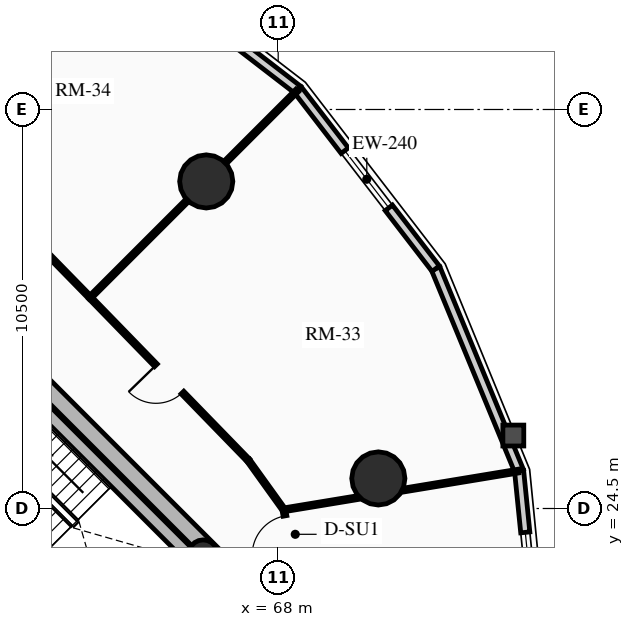
"""IFC4 building model, lengths in metres.
Left out: names, types, materials, properties, quantities, classifications, styles, units other than length and angle.
Written with IfcOpenShell. Run it as: python <this file> out.ifc"""

import sys

from ifc_helpers import new_model, si_unit, direction, frame, frame_2d, origin, origin_2d, place, context, subcontext, project, spatial, rectangle, circle, hollow_circle, extrude, source, transform, mapped, element, fill, save


model = new_model("IFC4")
c1 = context("Model", 3, precision=1e-05, world=origin(), true_north=direction((0.0, 1.0)))
c2 = subcontext(c1, "Body", "Model", "MODEL_VIEW")
j1 = project(units=[si_unit("LENGTHUNIT", "METRE"), si_unit("PLANEANGLEUNIT", "RADIAN")], contexts=[c1])
p1 = place(None, origin())
s1 = spatial("IfcSite", under=j1, at=p1, CompositionType="ELEMENT")
p2 = place(p1, origin())
s2 = spatial("IfcBuilding", under=s1, at=p2, CompositionType="ELEMENT")
p3 = place(p2, frame((0.0, 0.0, 99.25)))
s3 = spatial("IfcBuildingStorey", under=s2, at=p3, CompositionType="ELEMENT", Elevation=99.25)
p4 = place(p3, frame((66.303, 23.263, 0.0), z_axis=(0.0, 0.0, 1.0), x_axis=(-0.707106781187, 0.707106781187, 0.0)))
e1 = element("IfcWall", 1, at=p4, inside=s3, PredefinedType="SHEAR", context=c2, shape_type="SweptSolid", body=[
    extrude(rectangle(XDim=14.2, YDim=0.45, at=frame_2d((7.1, 0.0))), origin(), (0.0, 0.0, 1.0), 2.91),
])
p5 = place(p3, frame((58.578, 15.856, 0.0), z_axis=(0.0, 0.0, 1.0), x_axis=(0.707106781187, 0.707106781187, 0.0)))
e2 = element("IfcWall", 2, at=p5, inside=s3, PredefinedType="SHEAR", context=c2, shape_type="SweptSolid", body=[
    extrude(rectangle(XDim=10.7, YDim=0.45, at=frame_2d((5.35, 0.0))), origin(), (0.0, 0.0, 1.0), 2.91),
])
m1 = source(origin(), c2, "Body", "SweptSolid", [
    extrude(rectangle(XDim=1.5, YDim=2.02, at=frame_2d((0.75, 1.01))), frame((0.0, 0.235, 0.0), z_axis=(0.0, -1.0, 0.0), x_axis=(1.0, 0.0, 0.0)), (0.0, 0.0, 1.0), 0.47),
])
p6 = place(p5, frame((5.45, 0.0, 0.0)))
e3 = element("IfcOpeningElement", 3, at=p6, cuts=e2, PredefinedType="OPENING", context=c2, shape_type="MappedRepresentation", body=[
    mapped(m1, transform((0.0, 0.0, 0.0), x_axis=(1.0, 0.0, 0.0), y_axis=(0.0, 1.0, 0.0), z_axis=(0.0, 0.0, 1.0), scale=1.0)),
])
p7 = place(p3, frame((63.645, 20.922, 0.0), z_axis=(0.0, 0.0, 1.0), x_axis=(-0.707106781187, 0.707106781187, 0.0)))
e4 = element("IfcWall", 4, at=p7, inside=s3, PredefinedType="SHEAR", context=c2, shape_type="SweptSolid", body=[
    extrude(rectangle(XDim=13.75, YDim=0.35, at=frame_2d((6.875, 0.0))), origin(), (0.0, 0.0, 1.0), 2.91),
])
m2 = source(origin(), c2, "Body", "SweptSolid", [
    extrude(rectangle(XDim=1.1, YDim=2.015, at=frame_2d((0.55, 1.007))), frame((0.0, 0.185, 0.0), z_axis=(0.0, -1.0, 0.0), x_axis=(1.0, 0.0, 0.0)), (0.0, 0.0, 1.0), 0.37),
])
p8 = place(p7, frame((10.0, 0.0, 0.0)))
e5 = element("IfcOpeningElement", 5, at=p8, cuts=e4, PredefinedType="OPENING", context=c2, shape_type="MappedRepresentation", body=[
    mapped(m2, transform((0.0, 0.0, 0.0), x_axis=(1.0, 0.0, 0.0), y_axis=(0.0, 1.0, 0.0), z_axis=(0.0, 0.0, 1.0), scale=1.0)),
])
p9 = place(p7, frame((12.0, 0.0, 0.0)))
e6 = element("IfcOpeningElement", 6, at=p9, cuts=e4, PredefinedType="OPENING", context=c2, shape_type="MappedRepresentation", body=[
    mapped(m2, transform((0.0, 0.0, 0.0), x_axis=(1.0, 0.0, 0.0), y_axis=(0.0, 1.0, 0.0), z_axis=(0.0, 0.0, 1.0), scale=1.0)),
])
m3 = source(origin(), c2, "Body", "SweptSolid", [
    extrude(rectangle(XDim=1.15, YDim=2.02, at=frame_2d((0.575, 1.01))), frame((0.0, 0.185, 0.0), z_axis=(0.0, -1.0, 0.0), x_axis=(1.0, 0.0, 0.0)), (0.0, 0.0, 1.0), 0.37),
])
p10 = place(p7, frame((5.305, 0.0, 0.0)))
e7 = element("IfcOpeningElement", 7, at=p10, cuts=e4, PredefinedType="OPENING", context=c2, shape_type="MappedRepresentation", body=[
    mapped(m3, transform((0.0, 0.0, 0.0), x_axis=(1.0, 0.0, 0.0), y_axis=(0.0, 1.0, 0.0), z_axis=(0.0, 0.0, 1.0), scale=1.0)),
])
p11 = place(p3, frame((65.83, 23.107, 0.0), z_axis=(0.0, 0.0, 1.0), x_axis=(-0.707088616009, 0.707124945897, 0.0)))
e8 = element("IfcWall", 8, at=p11, inside=s3, PredefinedType="SHEAR", context=c2, shape_type="SweptSolid", body=[
    extrude(rectangle(XDim=6.72, YDim=0.35, at=frame_2d((3.36, 0.0))), origin(), (0.0, 0.0, 1.0), 2.91),
])
p12 = place(p3, frame((66.024, 23.294, 0.0), z_axis=(0.0, 0.0, 1.0), x_axis=(0.707106781187, 0.707106781187, 0.0)))
e9 = element("IfcColumn", 9, at=p12, inside=s3, PredefinedType="COLUMN", context=c2, shape_type="SweptSolid", body=[
    extrude(hollow_circle(Radius=0.38, WallThickness=0.032, at=origin_2d()), origin(), (0.0, 0.0, 1.0), 2.91),
])
for number, where, z_axis, x_axis in (
    (10, (66.107, 33.107, 0.0), (0.0, 0.0, 1.0), (1.0, 0.0, 0.0)),
    (11, (70.635, 25.291, 0.0), (0.0, 0.0, 1.0), (1.0, 0.0, 0.0)),
):
    element("IfcColumn", number, at=place(p3, frame(where, z_axis=z_axis, x_axis=x_axis)), inside=s3, PredefinedType="USERDEFINED", context=c2, shape_type="SweptSolid", body=[
        extrude(circle(Radius=0.7, at=origin_2d()), origin(), (0.0, 0.0, 1.0), 2.91),
    ])
p13 = place(p3, frame((63.811, 39.145, 0.0), z_axis=(0.0, 0.0, 1.0), x_axis=(0.791982052206, -0.61054437102, 0.0)))
e12 = element("IfcWall", 12, at=p13, inside=s3, PredefinedType="SOLIDWALL", context=c2, shape_type="SweptSolid", body=[
    extrude(rectangle(XDim=5.942, YDim=0.24, at=frame_2d((2.971, 0.0))), origin(), (0.0, 0.0, 1.0), 2.179),
])
p14 = place(p3, frame((74.339, 25.487, 0.0), z_axis=(0.0, 0.0, 1.0), x_axis=(0.10015591906, -0.994971754311, 0.0)))
e13 = element("IfcWall", 13, at=p14, inside=s3, PredefinedType="SOLIDWALL", context=c2, shape_type="SweptSolid", body=[
    extrude(rectangle(XDim=5.448, YDim=0.24, at=frame_2d((2.724, 0.0))), origin(), (0.0, 0.0, 1.0), 2.179),
])
m4 = source(origin(), c2, "Body", "SweptSolid", [
    extrude(rectangle(XDim=2.2, YDim=1.35, at=frame_2d((1.1, 0.675))), frame((0.0, 0.13, 0.0), z_axis=(0.0, -1.0, 0.0), x_axis=(1.0, 0.0, 0.0)), (0.0, 0.0, 1.0), 0.26),
])
p15 = place(p14, frame((1.624, 0.0, 0.65)))
e14 = element("IfcOpeningElement", 14, at=p15, cuts=e13, PredefinedType="OPENING", context=c2, shape_type="MappedRepresentation", body=[
    mapped(m4, transform((0.0, 0.0, 0.0), x_axis=(1.0, 0.0, 0.0), y_axis=(0.0, 1.0, 0.0), z_axis=(0.0, 0.0, 1.0), scale=1.0)),
])
p16 = place(p3, frame((72.145, 30.811, 0.0), z_axis=(0.0, 0.0, 1.0), x_axis=(0.381027003055, -0.924563909604, 0.0)))
e15 = element("IfcWall", 15, at=p16, inside=s3, PredefinedType="SOLIDWALL", context=c2, shape_type="SweptSolid", body=[
    extrude(rectangle(XDim=5.758, YDim=0.24, at=frame_2d((2.879, 0.0))), origin(), (0.0, 0.0, 1.0), 2.179),
])
p17 = place(p3, frame((68.517, 35.517, 0.0), z_axis=(0.0, 0.0, 1.0), x_axis=(0.61054437102, -0.791982052206, 0.0)))
e16 = element("IfcWall", 16, at=p17, inside=s3, PredefinedType="SOLIDWALL", context=c2, shape_type="SweptSolid", body=[
    extrude(rectangle(XDim=5.942, YDim=0.24, at=frame_2d((2.971, 0.0))), origin(), (0.0, 0.0, 1.0), 2.179),
])
m5 = source(origin(), c2, "Body", "SweptSolid", [
    extrude(rectangle(XDim=1.9, YDim=1.35, at=frame_2d((0.95, 0.675))), frame((0.0, 0.13, 0.0), z_axis=(0.0, -1.0, 0.0), x_axis=(1.0, 0.0, 0.0)), (0.0, 0.0, 1.0), 0.26),
])
p18 = place(p17, frame((2.021, 0.0, 0.65)))
e17 = element("IfcOpeningElement", 17, at=p18, cuts=e16, PredefinedType="OPENING", context=c2, shape_type="MappedRepresentation", body=[
    mapped(m5, transform((0.0, 0.0, 0.0), x_axis=(1.0, 0.0, 0.0), y_axis=(0.0, 1.0, 0.0), z_axis=(0.0, 0.0, 1.0), scale=1.0)),
])
p19 = place(p3, frame((63.051, 30.051, 0.0), z_axis=(0.0, 0.0, 1.0), x_axis=(-0.698911483116, 0.715208178622, 0.0)))
e18 = element("IfcWall", 18, at=p19, inside=s3, PredefinedType="MOVABLE", context=c2, shape_type="SweptSolid", body=[
    extrude(rectangle(XDim=6.082, YDim=0.1, at=frame_2d((3.041, 0.0))), origin(), (0.0, 0.0, 1.0), 2.225),
])
p20 = place(p3, frame((68.394, 23.113, 0.0), z_axis=(0.0, 0.0, 1.0), x_axis=(-0.177868948753, 0.984054184011, 0.0)))
e19 = element("IfcWall", 19, at=p20, inside=s3, PredefinedType="MOVABLE", context=c2, shape_type="SweptSolid", body=[
    extrude(rectangle(XDim=1.374, YDim=0.1, at=frame_2d((0.687, 0.0))), origin(), (0.0, 0.0, 1.0), 2.225),
])
m6 = source(origin(), c2, "Body", "SweptSolid", [
    extrude(rectangle(XDim=1.05, YDim=2.015, at=frame_2d((0.525, 1.007))), frame((0.0, 0.06, 0.0), z_axis=(0.0, -1.0, 0.0), x_axis=(1.0, 0.0, 0.0)), (0.0, 0.0, 1.0), 0.12),
])
p21 = place(p20, frame((0.162, 0.0, 0.0)))
e20 = element("IfcOpeningElement", 20, at=p21, cuts=e19, PredefinedType="OPENING", context=c2, shape_type="MappedRepresentation", body=[
    mapped(m6, transform((0.0, 0.0, 0.0), x_axis=(1.0, 0.0, 0.0), y_axis=(0.0, 1.0, 0.0), z_axis=(0.0, 0.0, 1.0), scale=1.0)),
])
p22 = place(p3, frame((68.15, 24.465, 0.0), z_axis=(0.0, 0.0, 1.0), x_axis=(-0.58376767291, 0.811920749868, 0.0)))
e21 = element("IfcWall", 21, at=p22, inside=s3, PredefinedType="MOVABLE", context=c2, shape_type="SweptSolid", body=[
    extrude(rectangle(XDim=1.605, YDim=0.1, at=frame_2d((0.803, 0.0))), origin(), (0.0, 0.0, 1.0), 2.225),
])
p23 = place(p3, frame((67.213, 25.768, 0.0), z_axis=(0.0, 0.0, 1.0), x_axis=(-0.696916079748, 0.717152687918, 0.0)))
e22 = element("IfcWall", 22, at=p23, inside=s3, PredefinedType="MOVABLE", context=c2, shape_type="SweptSolid", body=[
    extrude(rectangle(XDim=5.972, YDim=0.1, at=frame_2d((2.986, 0.0))), origin(), (0.0, 0.0, 1.0), 2.655),
])
m7 = source(origin(), c2, "Body", "SweptSolid", [
    extrude(rectangle(XDim=1.0, YDim=2.015, at=frame_2d((0.5, 1.007))), frame((0.0, 0.06, 0.0), z_axis=(0.0, -1.0, 0.0), x_axis=(1.0, 0.0, 0.0)), (0.0, 0.0, 1.0), 0.12),
])
p24 = place(p23, frame((2.486, 0.0, 0.0)))
e23 = element("IfcOpeningElement", 23, at=p24, cuts=e22, PredefinedType="OPENING", context=c2, shape_type="MappedRepresentation", body=[
    mapped(m7, transform((0.0, 0.0, 0.0), x_axis=(1.0, 0.0, 0.0), y_axis=(0.0, 1.0, 0.0), z_axis=(0.0, 0.0, 1.0), scale=1.0)),
])
p25 = place(p3, frame((63.051, 30.051, 0.0), z_axis=(0.0, 0.0, 1.0), x_axis=(0.707106781187, 0.707106781187, 0.0)))
e24 = element("IfcWall", 24, at=p25, inside=s3, PredefinedType="MOVABLE", context=c2, shape_type="SweptSolid", body=[
    extrude(rectangle(XDim=7.711, YDim=0.1, at=frame_2d((3.855, 0.0))), origin(), (0.0, 0.0, 1.0), 2.179),
])
p26 = place(p3, frame((68.15, 24.465, 0.0), z_axis=(0.0, 0.0, 1.0), x_axis=(0.986627164528, 0.162993368625, 0.0)))
e25 = element("IfcWall", 25, at=p26, inside=s3, PredefinedType="MOVABLE", context=c2, shape_type="SweptSolid", body=[
    extrude(rectangle(XDim=6.254, YDim=0.1, at=frame_2d((3.127, 0.0))), origin(), (0.0, 0.0, 1.0), 2.179),
])
m8 = source(origin(), c2, "Body", "SweptSolid", [
    extrude(rectangle(XDim=2.2, YDim=1.35, at=frame_2d((1.1, 0.675))), frame((0.0, 0.03, 0.0), z_axis=(0.0, -1.0, 0.0), x_axis=(1.0, 0.0, 0.0)), (0.0, 0.0, 1.0), 0.06),
])
p27 = place(p15, origin())
e26 = element("IfcWindow", 26, at=p27, inside=s3, PartitioningType="DOUBLE_PANEL_VERTICAL", PredefinedType="WINDOW", context=c2, shape_type="MappedRepresentation", body=[
    mapped(m8, transform((0.0, 0.0, 0.0), x_axis=(1.0, 0.0, 0.0), y_axis=(0.0, 1.0, 0.0), z_axis=(0.0, 0.0, 1.0), scale=1.0)),
])
fill(e14, e26)
m9 = source(origin(), c2, "Body", "SweptSolid", [
    extrude(rectangle(XDim=1.9, YDim=1.35, at=frame_2d((0.95, 0.675))), frame((0.0, 0.03, 0.0), z_axis=(0.0, -1.0, 0.0), x_axis=(1.0, 0.0, 0.0)), (0.0, 0.0, 1.0), 0.06),
])
p28 = place(p18, origin())
e27 = element("IfcWindow", 27, at=p28, inside=s3, PartitioningType="DOUBLE_PANEL_VERTICAL", PredefinedType="WINDOW", context=c2, shape_type="MappedRepresentation", body=[
    mapped(m9, transform((0.0, 0.0, 0.0), x_axis=(1.0, 0.0, 0.0), y_axis=(0.0, 1.0, 0.0), z_axis=(0.0, 0.0, 1.0), scale=1.0)),
])
fill(e17, e27)
m10 = source(origin(), c2, "Body", "SweptSolid", [
    extrude(rectangle(XDim=1.05, YDim=2.015, at=frame_2d((0.525, 1.007))), frame((0.0, 0.025, 0.0), z_axis=(0.0, -1.0, 0.0), x_axis=(1.0, 0.0, 0.0)), (0.0, 0.0, 1.0), 0.05),
])
p29 = place(p21, origin())
e28 = element("IfcDoor", 28, at=p29, inside=s3, OperationType="SINGLE_SWING_LEFT", PredefinedType="DOOR", context=c2, shape_type="MappedRepresentation", body=[
    mapped(m10, transform((0.0, 0.0, 0.0), x_axis=(1.0, 0.0, 0.0), y_axis=(0.0, 1.0, 0.0), z_axis=(0.0, 0.0, 1.0), scale=1.0)),
])
fill(e20, e28)
m11 = source(origin(), c2, "Body", "SweptSolid", [
    extrude(rectangle(XDim=1.0, YDim=2.015, at=frame_2d((0.5, 1.007))), frame((0.0, 0.025, 0.0), z_axis=(0.0, -1.0, 0.0), x_axis=(1.0, 0.0, 0.0)), (0.0, 0.0, 1.0), 0.05),
])
p30 = place(p24, origin())
e29 = element("IfcDoor", 29, at=p30, inside=s3, OperationType="SINGLE_SWING_RIGHT", PredefinedType="DOOR", context=c2, shape_type="MappedRepresentation", body=[
    mapped(m11, transform((0.0, 0.0, 0.0), x_axis=(1.0, 0.0, 0.0), y_axis=(0.0, 1.0, 0.0), z_axis=(0.0, 0.0, 1.0), scale=1.0)),
])
fill(e23, e29)
save(model, sys.argv[1])
